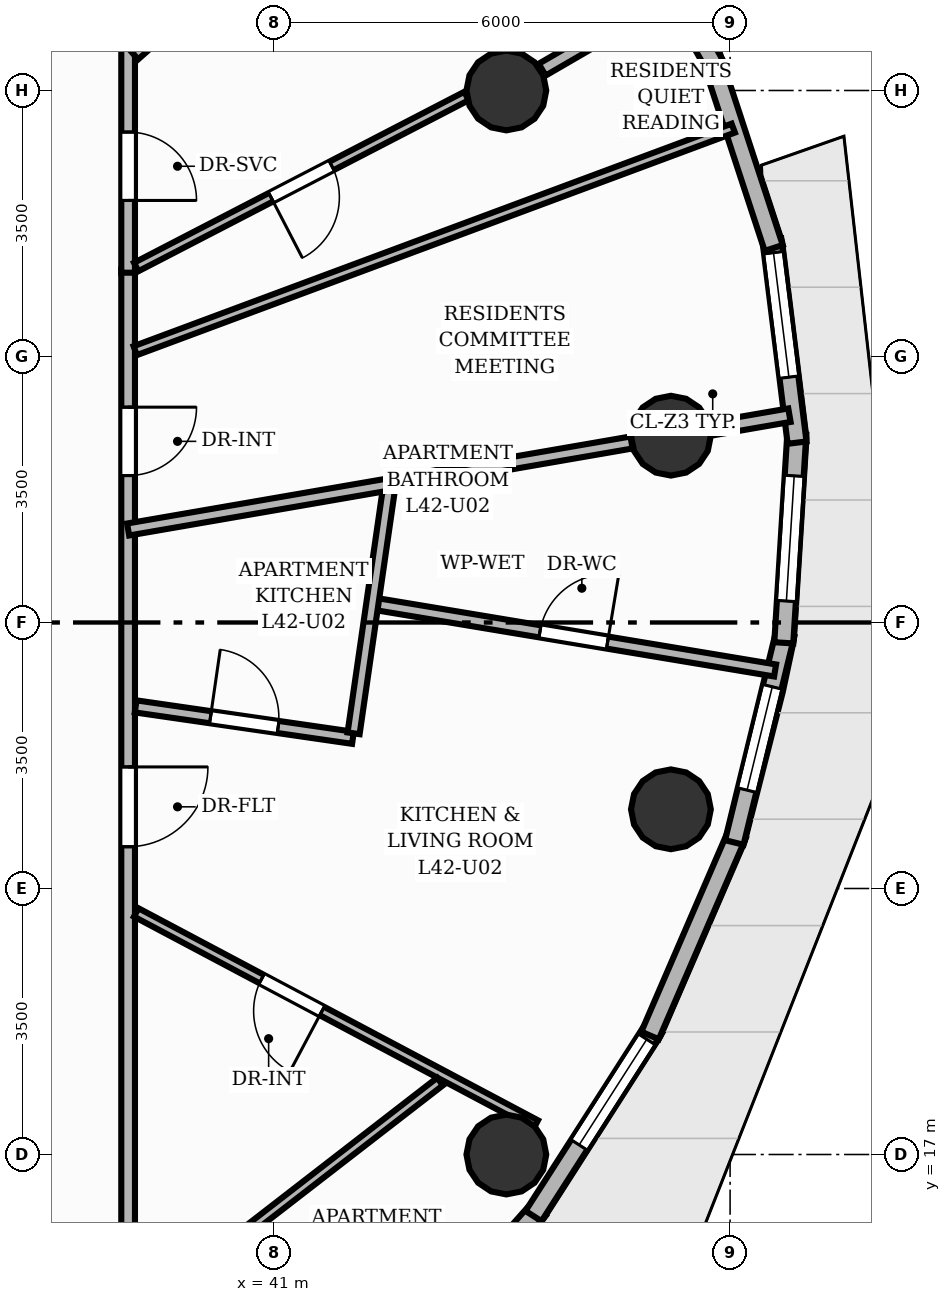
"""IFC4 building model, lengths in metres.
Left out: names, types, materials, properties, quantities, classifications, styles, units other than length and angle.
Written with IfcOpenShell. Run it as: python <this file> out.ifc"""

import sys

from ifc_helpers import new_model, si_unit, direction, frame, frame_2d, origin, origin_2d, place, context, subcontext, project, spatial, rectangle, circle, extrude, element, fill, save


model = new_model("IFC4")
c1 = context("Model", 3, precision=1e-05, world=origin(), true_north=direction((0.0, 1.0)))
c2 = subcontext(c1, "Body", "Model", "MODEL_VIEW")
j1 = project(units=[si_unit("LENGTHUNIT", "METRE"), si_unit("PLANEANGLEUNIT", "RADIAN")], contexts=[c1])
p1 = place(None, origin())
s1 = spatial("IfcSite", under=j1, at=p1, CompositionType="ELEMENT")
p2 = place(p1, origin())
s2 = spatial("IfcBuilding", under=s1, at=p2, CompositionType="ELEMENT")
p3 = place(p2, frame((0.0, 0.0, 142.56)))
s3 = spatial("IfcBuildingStorey", under=s2, at=p3, CompositionType="ELEMENT", Elevation=142.56)
for number, where, z_axis, x_axis in (
    (1, (46.221, 26.458, 0.0), (0.0, 0.0, 1.0), (1.0, 0.0, 0.0)),
    (2, (44.056, 31.0, 0.0), (0.0, 0.0, 1.0), (1.0, 0.0, 0.0)),
    (3, (44.056, 17.0, 0.0), (0.0, 0.0, 1.0), (1.0, 0.0, 0.0)),
    (4, (46.221, 21.542, 0.0), (0.0, 0.0, 1.0), (1.0, 0.0, 0.0)),
):
    element("IfcColumn", number, at=place(p3, frame(where, z_axis=z_axis, x_axis=x_axis)), inside=s3, PredefinedType="COLUMN", context=c2, shape_type="SweptSolid", body=[
        extrude(circle(Radius=0.525, at=origin_2d()), origin(), (0.0, 0.0, 1.0), 3.2),
    ])
p4 = place(p3, frame((44.48, 16.277, 0.0), z_axis=(0.0, 0.0, 1.0), x_axis=(-0.664002369324, -0.747730468506, 0.0)))
e5 = element("IfcWall", 5, at=p4, inside=s3, PredefinedType="SOLIDWALL", context=c2, shape_type="SweptSolid", body=[
    extrude(rectangle(XDim=2.977, YDim=0.25, at=frame_2d((1.489, 0.0))), origin(), (0.0, 0.0, 1.0), 2.96),
])
p5 = place(p3, frame((45.998, 18.663, 0.0), z_axis=(0.0, 0.0, 1.0), x_axis=(-0.539492373821, -0.841990486044, 0.0)))
e6 = element("IfcWall", 6, at=p5, inside=s3, PredefinedType="SOLIDWALL", context=c2, shape_type="SweptSolid", body=[
    extrude(rectangle(XDim=2.937, YDim=0.25, at=frame_2d((1.469, 0.0))), origin(), (0.0, 0.0, 1.0), 2.96),
])
p6 = place(p5, frame((0.175, 0.0, 0.85)))
e7 = element("IfcOpeningElement", 7, at=p6, cuts=e6, PredefinedType="OPENING", context=c2, shape_type="SweptSolid", body=[
    extrude(rectangle(XDim=1.65, YDim=1.55, at=frame_2d((0.825, 0.775))), frame((0.0, 0.135, 0.0), z_axis=(0.0, -1.0, 0.0), x_axis=(1.0, 0.0, 0.0)), (0.0, 0.0, 1.0), 0.27),
])
p7 = place(p3, frame((47.091, 21.211, 0.0), z_axis=(0.0, 0.0, 1.0), x_axis=(-0.397015319193, -0.917811983102, 0.0)))
e8 = element("IfcWall", 8, at=p7, inside=s3, PredefinedType="SOLIDWALL", context=c2, shape_type="SweptSolid", body=[
    extrude(rectangle(XDim=2.882, YDim=0.25, at=frame_2d((1.441, 0.0))), origin(), (0.0, 0.0, 1.0), 2.96),
])
p8 = place(p3, frame((47.723, 23.843, 0.0), z_axis=(0.0, 0.0, 1.0), x_axis=(-0.236986101123, -0.971513040507, 0.0)))
e9 = element("IfcWall", 9, at=p8, inside=s3, PredefinedType="SOLIDWALL", context=c2, shape_type="SweptSolid", body=[
    extrude(rectangle(XDim=2.818, YDim=0.25, at=frame_2d((1.409, 0.0))), origin(), (0.0, 0.0, 1.0), 2.96),
])
p9 = place(p8, frame((0.709, 0.0, 0.85)))
e10 = element("IfcOpeningElement", 10, at=p9, cuts=e9, PredefinedType="OPENING", context=c2, shape_type="SweptSolid", body=[
    extrude(rectangle(XDim=1.4, YDim=1.55, at=frame_2d((0.7, 0.775))), frame((0.0, 0.135, 0.0), z_axis=(0.0, -1.0, 0.0), x_axis=(1.0, 0.0, 0.0)), (0.0, 0.0, 1.0), 0.27),
])
p10 = place(p3, frame((47.878, 26.479, 0.0), z_axis=(0.0, 0.0, 1.0), x_axis=(-0.062278868317, -0.998058787127, 0.0)))
e11 = element("IfcWall", 11, at=p10, inside=s3, PredefinedType="SOLIDWALL", context=c2, shape_type="SweptSolid", body=[
    extrude(rectangle(XDim=2.752, YDim=0.25, at=frame_2d((1.376, 0.0))), origin(), (0.0, 0.0, 1.0), 2.96),
])
p11 = place(p10, frame((0.551, 0.0, 0.85)))
e12 = element("IfcOpeningElement", 12, at=p11, cuts=e11, PredefinedType="OPENING", context=c2, shape_type="SweptSolid", body=[
    extrude(rectangle(XDim=1.65, YDim=1.55, at=frame_2d((0.825, 0.775))), frame((0.0, 0.135, 0.0), z_axis=(0.0, -1.0, 0.0), x_axis=(1.0, 0.0, 0.0)), (0.0, 0.0, 1.0), 0.27),
])
p12 = place(p3, frame((47.549, 29.039, 0.0), z_axis=(0.0, 0.0, 1.0), x_axis=(0.123197890413, -0.992382123881, 0.0)))
e13 = element("IfcWall", 13, at=p12, inside=s3, PredefinedType="SOLIDWALL", context=c2, shape_type="SweptSolid", body=[
    extrude(rectangle(XDim=2.693, YDim=0.25, at=frame_2d((1.347, 0.0))), origin(), (0.0, 0.0, 1.0), 2.96),
])
p13 = place(p12, frame((0.175, 0.0, 0.85)))
e14 = element("IfcOpeningElement", 14, at=p13, cuts=e13, PredefinedType="OPENING", context=c2, shape_type="SweptSolid", body=[
    extrude(rectangle(XDim=1.65, YDim=1.55, at=frame_2d((0.825, 0.775))), frame((0.0, 0.135, 0.0), z_axis=(0.0, -1.0, 0.0), x_axis=(1.0, 0.0, 0.0)), (0.0, 0.0, 1.0), 0.27),
])
p14 = place(p3, frame((46.749, 31.444, 0.0), z_axis=(0.0, 0.0, 1.0), x_axis=(0.311522010952, -0.950238936633, 0.0)))
e15 = element("IfcWall", 15, at=p14, inside=s3, PredefinedType="SOLIDWALL", context=c2, shape_type="SweptSolid", body=[
    extrude(rectangle(XDim=2.648, YDim=0.25, at=frame_2d((1.324, 0.0))), origin(), (0.0, 0.0, 1.0), 2.96),
])
p15 = place(p3, frame((45.502, 33.623, 0.0), z_axis=(0.0, 0.0, 1.0), x_axis=(0.492909281161, -0.870080709214, 0.0)))
e16 = element("IfcWall", 16, at=p15, inside=s3, PredefinedType="SOLIDWALL", context=c2, shape_type="SweptSolid", body=[
    extrude(rectangle(XDim=2.624, YDim=0.25, at=frame_2d((1.312, 0.0))), origin(), (0.0, 0.0, 1.0), 2.96),
])
p16 = place(p3, frame((46.758, 26.551, 0.0), z_axis=(0.0, 0.0, 1.0), x_axis=(0.985390767806, 0.170308645474, 0.0)))
e17 = element("IfcWall", 17, at=p16, inside=s3, PredefinedType="PARTITIONING", context=c2, shape_type="SweptSolid", body=[
    extrude(rectangle(XDim=1.038, YDim=0.18, at=frame_2d((0.519, 0.0))), origin(), (0.0, 0.0, 1.0), 2.336),
])
p17 = place(p3, frame((44.528, 31.274, 0.0), z_axis=(0.0, 0.0, 1.0), x_axis=(0.864802971131, 0.502111363268, 0.0)))
e18 = element("IfcWall", 18, at=p17, inside=s3, PredefinedType="PARTITIONING", context=c2, shape_type="SweptSolid", body=[
    extrude(rectangle(XDim=1.951, YDim=0.18, at=frame_2d((0.975, 0.0))), origin(), (0.0, 0.0, 1.0), 2.336),
])
p18 = place(p3, frame((39.08, 28.645, 0.0), z_axis=(0.0, 0.0, 1.0), x_axis=(0.0, -1.0, 0.0)))
e19 = element("IfcWall", 19, at=p18, inside=s3, PredefinedType="PARTITIONING", context=c2, shape_type="SweptSolid", body=[
    extrude(rectangle(XDim=13.225, YDim=0.18, at=frame_2d((6.613, 0.0))), origin(), (0.0, 0.0, 1.0), 2.955),
])
p19 = place(p18, frame((6.545, 0.0, 0.0)))
e20 = element("IfcOpeningElement", 20, at=p19, cuts=e19, PredefinedType="OPENING", context=c2, shape_type="SweptSolid", body=[
    extrude(rectangle(XDim=1.05, YDim=2.15, at=frame_2d((0.525, 1.075))), frame((0.0, 0.1, 0.0), z_axis=(0.0, -1.0, 0.0), x_axis=(1.0, 0.0, 0.0)), (0.0, 0.0, 1.0), 0.2),
])
p20 = place(p18, frame((1.812, 0.0, 0.0)))
e21 = element("IfcOpeningElement", 21, at=p20, cuts=e19, PredefinedType="OPENING", context=c2, shape_type="SweptSolid", body=[
    extrude(rectangle(XDim=0.9, YDim=2.1, at=frame_2d((0.45, 1.05))), frame((0.0, 0.1, 0.0), z_axis=(0.0, -1.0, 0.0), x_axis=(1.0, 0.0, 0.0)), (0.0, 0.0, 1.0), 0.2),
])
p21 = place(p3, frame((39.08, 32.52, 0.0), z_axis=(0.0, 0.0, 1.0), x_axis=(0.0, -1.0, 0.0)))
e22 = element("IfcWall", 22, at=p21, inside=s3, PredefinedType="PARTITIONING", context=c2, shape_type="SweptSolid", body=[
    extrude(rectangle(XDim=3.918, YDim=0.18, at=frame_2d((1.959, 0.0))), origin(), (0.0, 0.0, 1.0), 2.955),
])
p22 = place(p21, frame((2.067, 0.0, 0.0)))
e23 = element("IfcOpeningElement", 23, at=p22, cuts=e22, PredefinedType="OPENING", context=c2, shape_type="SweptSolid", body=[
    extrude(rectangle(XDim=0.9, YDim=2.1, at=frame_2d((0.45, 1.05))), frame((0.0, 0.1, 0.0), z_axis=(0.0, -1.0, 0.0), x_axis=(1.0, 0.0, 0.0)), (0.0, 0.0, 1.0), 0.2),
])
p23 = place(p3, frame((42.294, 24.25, 0.0), z_axis=(0.0, 0.0, 1.0), x_axis=(0.986430753195, -0.164177858287, 0.0)))
e24 = element("IfcWall", 24, at=p23, inside=s3, PredefinedType="PLUMBINGWALL", context=c2, shape_type="SweptSolid", body=[
    extrude(rectangle(XDim=5.371, YDim=0.16, at=frame_2d((2.686, 0.0))), origin(), (0.0, 0.0, 1.0), 2.955),
])
p24 = place(p23, frame((2.236, 0.0, 0.0)))
e25 = element("IfcOpeningElement", 25, at=p24, cuts=e24, PredefinedType="OPENING", context=c2, shape_type="SweptSolid", body=[
    extrude(rectangle(XDim=0.9, YDim=2.1, at=frame_2d((0.45, 1.05))), frame((0.0, 0.09, 0.0), z_axis=(0.0, -1.0, 0.0), x_axis=(1.0, 0.0, 0.0)), (0.0, 0.0, 1.0), 0.18),
])
p25 = place(p3, frame((44.443, 17.395, 0.0), z_axis=(0.0, 0.0, 1.0), x_axis=(-0.883258541518, 0.468886285612, 0.0)))
e26 = element("IfcWall", 26, at=p25, inside=s3, PredefinedType="PARTITIONING", context=c2, shape_type="SweptSolid", body=[
    extrude(rectangle(XDim=5.952, YDim=0.125, at=frame_2d((2.976, 0.0))), origin(), (0.0, 0.0, 1.0), 2.955),
])
p26 = place(p25, frame((3.184, 0.0, 0.0)))
e27 = element("IfcOpeningElement", 27, at=p26, cuts=e26, PredefinedType="OPENING", context=c2, shape_type="SweptSolid", body=[
    extrude(rectangle(XDim=0.9, YDim=2.1, at=frame_2d((0.45, 1.05))), frame((0.0, 0.073, 0.0), z_axis=(0.0, -1.0, 0.0), x_axis=(1.0, 0.0, 0.0)), (0.0, 0.0, 1.0), 0.145),
])
p27 = place(p3, frame((39.179, 22.896, 0.0), z_axis=(0.0, 0.0, 1.0), x_axis=(0.989697773488, -0.143172333756, 0.0)))
e28 = element("IfcWall", 28, at=p27, inside=s3, PredefinedType="PLUMBINGWALL", context=c2, shape_type="SweptSolid", body=[
    extrude(rectangle(XDim=2.889, YDim=0.16, at=frame_2d((1.444, 0.0))), origin(), (0.0, 0.0, 1.0), 2.336),
])
p28 = place(p27, frame((0.994, 0.0, 0.0)))
e29 = element("IfcOpeningElement", 29, at=p28, cuts=e28, PredefinedType="OPENING", context=c2, shape_type="SweptSolid", body=[
    extrude(rectangle(XDim=0.9, YDim=2.1, at=frame_2d((0.45, 1.05))), frame((0.0, 0.09, 0.0), z_axis=(0.0, -1.0, 0.0), x_axis=(1.0, 0.0, 0.0)), (0.0, 0.0, 1.0), 0.18),
])
p29 = place(p3, frame((42.046, 22.542, 0.0), z_axis=(0.0, 0.0, 1.0), x_axis=(0.143217612057, 0.98969122235, 0.0)))
e30 = element("IfcWall", 30, at=p29, inside=s3, PredefinedType="PLUMBINGWALL", context=c2, shape_type="SweptSolid", body=[
    extrude(rectangle(XDim=3.311, YDim=0.16, at=frame_2d((1.655, 0.0))), origin(), (0.0, 0.0, 1.0), 2.955),
])
p30 = place(p3, frame((39.08, 25.224, 0.0), z_axis=(0.0, 0.0, 1.0), x_axis=(0.985384524795, 0.17034476304, 0.0)))
e31 = element("IfcWall", 31, at=p30, inside=s3, PredefinedType="PLUMBINGWALL", context=c2, shape_type="SweptSolid", body=[
    extrude(rectangle(XDim=6.722, YDim=0.16, at=frame_2d((3.361, 0.0))), origin(), (0.0, 0.0, 1.0), 2.336),
])
p31 = place(p3, frame((43.184, 17.96, 0.0), z_axis=(0.0, 0.0, 1.0), x_axis=(-0.790862802872, -0.611993486104, 0.0)))
e32 = element("IfcWall", 32, at=p31, inside=s3, PredefinedType="PARTITIONING", context=c2, shape_type="SweptSolid", body=[
    extrude(rectangle(XDim=9.975, YDim=0.125, at=frame_2d((4.987, 0.0))), origin(), (0.0, 0.0, 1.0), 2.411),
])
p32 = place(p31, frame((3.417, 0.0, 0.0)))
e33 = element("IfcOpeningElement", 33, at=p32, cuts=e32, PredefinedType="OPENING", context=c2, shape_type="SweptSolid", body=[
    extrude(rectangle(XDim=0.9, YDim=2.1, at=frame_2d((0.45, 1.05))), frame((0.0, 0.073, 0.0), z_axis=(0.0, -1.0, 0.0), x_axis=(1.0, 0.0, 0.0)), (0.0, 0.0, 1.0), 0.145),
])
p33 = place(p3, frame((43.783, 35.524, 0.0), z_axis=(0.0, 0.0, 1.0), x_axis=(-0.750018545151, -0.661416798947, 0.0)))
e34 = element("IfcWall", 34, at=p33, inside=s3, PredefinedType="PARTITIONING", context=c2, shape_type="SweptSolid", body=[
    extrude(rectangle(XDim=6.15, YDim=0.125, at=frame_2d((3.075, 0.0))), origin(), (0.0, 0.0, 1.0), 2.692),
])
p34 = place(p3, frame((43.531, 30.927, 0.0), z_axis=(0.0, 0.0, 1.0), x_axis=(-0.888041341995, -0.459763607638, 0.0)))
e35 = element("IfcWall", 35, at=p34, inside=s3, PredefinedType="PARTITIONING", context=c2, shape_type="SweptSolid", body=[
    extrude(rectangle(XDim=4.893, YDim=0.125, at=frame_2d((2.446, 0.0))), origin(), (0.0, 0.0, 1.0), 2.336),
])
p35 = place(p34, frame((1.996, 0.0, 0.0)))
e36 = element("IfcOpeningElement", 36, at=p35, cuts=e35, PredefinedType="OPENING", context=c2, shape_type="SweptSolid", body=[
    extrude(rectangle(XDim=0.9, YDim=2.1, at=frame_2d((0.45, 1.05))), frame((0.0, 0.073, 0.0), z_axis=(0.0, -1.0, 0.0), x_axis=(1.0, 0.0, 0.0)), (0.0, 0.0, 1.0), 0.145),
])
p36 = place(p3, frame((39.174, 27.577, 0.0), z_axis=(0.0, 0.0, 1.0), x_axis=(0.9372070401, 0.348773513883, 0.0)))
e37 = element("IfcWall", 37, at=p36, inside=s3, PredefinedType="PARTITIONING", context=c2, shape_type="SweptSolid", body=[
    extrude(rectangle(XDim=8.395, YDim=0.125, at=frame_2d((4.198, 0.0))), origin(), (0.0, 0.0, 1.0), 2.692),
])
p37 = place(p6, origin())
e38 = element("IfcWindow", 38, at=p37, inside=s3, PartitioningType="SINGLE_PANEL", PredefinedType="WINDOW", context=c2, shape_type="SweptSolid", body=[
    extrude(rectangle(XDim=1.65, YDim=1.55, at=frame_2d((0.825, 0.775))), frame((0.0, 0.03, 0.0), z_axis=(0.0, -1.0, 0.0), x_axis=(1.0, 0.0, 0.0)), (0.0, 0.0, 1.0), 0.06),
])
fill(e7, e38)
p38 = place(p9, origin())
e39 = element("IfcWindow", 39, at=p38, inside=s3, PartitioningType="SINGLE_PANEL", PredefinedType="WINDOW", context=c2, shape_type="SweptSolid", body=[
    extrude(rectangle(XDim=1.4, YDim=1.55, at=frame_2d((0.7, 0.775))), frame((0.0, 0.03, 0.0), z_axis=(0.0, -1.0, 0.0), x_axis=(1.0, 0.0, 0.0)), (0.0, 0.0, 1.0), 0.06),
])
fill(e10, e39)
p39 = place(p11, origin())
e40 = element("IfcWindow", 40, at=p39, inside=s3, PartitioningType="SINGLE_PANEL", PredefinedType="WINDOW", context=c2, shape_type="SweptSolid", body=[
    extrude(rectangle(XDim=1.65, YDim=1.55, at=frame_2d((0.825, 0.775))), frame((0.0, 0.03, 0.0), z_axis=(0.0, -1.0, 0.0), x_axis=(1.0, 0.0, 0.0)), (0.0, 0.0, 1.0), 0.06),
])
fill(e12, e40)
p40 = place(p13, origin())
e41 = element("IfcWindow", 41, at=p40, inside=s3, PartitioningType="SINGLE_PANEL", PredefinedType="WINDOW", context=c2, shape_type="SweptSolid", body=[
    extrude(rectangle(XDim=1.65, YDim=1.55, at=frame_2d((0.825, 0.775))), frame((0.0, 0.03, 0.0), z_axis=(0.0, -1.0, 0.0), x_axis=(1.0, 0.0, 0.0)), (0.0, 0.0, 1.0), 0.06),
])
fill(e14, e41)
p41 = place(p19, origin())
e42 = element("IfcDoor", 42, at=p41, inside=s3, OperationType="SINGLE_SWING_LEFT", PredefinedType="DOOR", context=c2, shape_type="SweptSolid", body=[
    extrude(rectangle(XDim=1.05, YDim=2.15, at=frame_2d((0.525, 1.075))), frame((0.0, 0.025, 0.0), z_axis=(0.0, -1.0, 0.0), x_axis=(1.0, 0.0, 0.0)), (0.0, 0.0, 1.0), 0.05),
])
fill(e20, e42)
p42 = place(p24, origin())
e43 = element("IfcDoor", 43, at=p42, inside=s3, OperationType="SINGLE_SWING_RIGHT", PredefinedType="DOOR", context=c2, shape_type="SweptSolid", body=[
    extrude(rectangle(XDim=0.9, YDim=2.1, at=frame_2d((0.45, 1.05))), frame((0.0, 0.025, 0.0), z_axis=(0.0, -1.0, 0.0), x_axis=(1.0, 0.0, 0.0)), (0.0, 0.0, 1.0), 0.05),
])
fill(e25, e43)
p43 = place(p26, origin())
e44 = element("IfcDoor", 44, at=p43, inside=s3, OperationType="SINGLE_SWING_LEFT", PredefinedType="DOOR", context=c2, shape_type="SweptSolid", body=[
    extrude(rectangle(XDim=0.9, YDim=2.1, at=frame_2d((0.45, 1.05))), frame((0.0, 0.025, 0.0), z_axis=(0.0, -1.0, 0.0), x_axis=(1.0, 0.0, 0.0)), (0.0, 0.0, 1.0), 0.05),
])
fill(e27, e44)
p44 = place(p28, origin())
e45 = element("IfcDoor", 45, at=p44, inside=s3, OperationType="SINGLE_SWING_LEFT", PredefinedType="DOOR", context=c2, shape_type="SweptSolid", body=[
    extrude(rectangle(XDim=0.9, YDim=2.1, at=frame_2d((0.45, 1.05))), frame((0.0, 0.025, 0.0), z_axis=(0.0, -1.0, 0.0), x_axis=(1.0, 0.0, 0.0)), (0.0, 0.0, 1.0), 0.05),
])
fill(e29, e45)
p45 = place(p22, origin())
e46 = element("IfcDoor", 46, at=p45, inside=s3, OperationType="SINGLE_SWING_RIGHT", PredefinedType="DOOR", context=c2, shape_type="SweptSolid", body=[
    extrude(rectangle(XDim=0.9, YDim=2.1, at=frame_2d((0.45, 1.05))), frame((0.0, 0.025, 0.0), z_axis=(0.0, -1.0, 0.0), x_axis=(1.0, 0.0, 0.0)), (0.0, 0.0, 1.0), 0.05),
])
fill(e23, e46)
p46 = place(p20, origin())
e47 = element("IfcDoor", 47, at=p46, inside=s3, OperationType="SINGLE_SWING_LEFT", PredefinedType="DOOR", context=c2, shape_type="SweptSolid", body=[
    extrude(rectangle(XDim=0.9, YDim=2.1, at=frame_2d((0.45, 1.05))), frame((0.0, 0.025, 0.0), z_axis=(0.0, -1.0, 0.0), x_axis=(1.0, 0.0, 0.0)), (0.0, 0.0, 1.0), 0.05),
])
fill(e21, e47)
p47 = place(p35, origin())
e48 = element("IfcDoor", 48, at=p47, inside=s3, OperationType="SINGLE_SWING_RIGHT", PredefinedType="DOOR", context=c2, shape_type="SweptSolid", body=[
    extrude(rectangle(XDim=0.9, YDim=2.1, at=frame_2d((0.45, 1.05))), frame((0.0, 0.025, 0.0), z_axis=(0.0, -1.0, 0.0), x_axis=(1.0, 0.0, 0.0)), (0.0, 0.0, 1.0), 0.05),
])
fill(e36, e48)
save(model, sys.argv[1])
